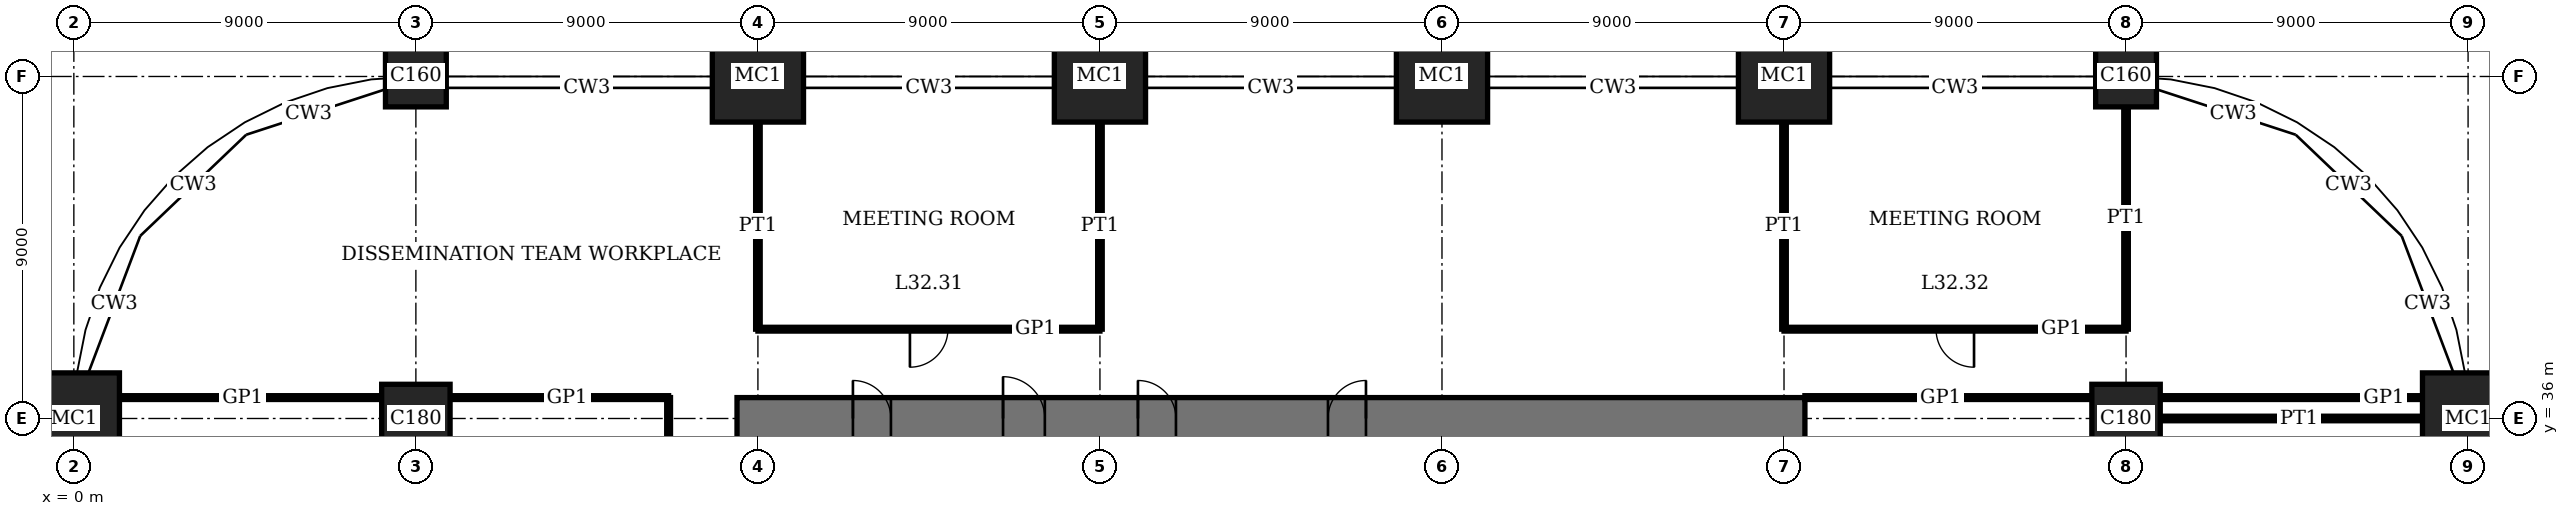
"""IFC4 building model, lengths in metres.
Left out: names, types, materials, properties, quantities, classifications, styles, units other than length and angle.
Written with IfcOpenShell. Run it as: python <this file> out.ifc"""

import sys

from ifc_helpers import new_model, si_unit, direction, frame, frame_2d, origin, origin_2d, place, context, subcontext, project, spatial, rectangle, extrude, element, fill, save


model = new_model("IFC4")
c1 = context("Model", 3, precision=1e-05, world=origin(), true_north=direction((0.0, 1.0)))
c2 = subcontext(c1, "Body", "Model", "MODEL_VIEW")
j1 = project(units=[si_unit("LENGTHUNIT", "METRE"), si_unit("PLANEANGLEUNIT", "RADIAN")], contexts=[c1])
p1 = place(None, origin())
s1 = spatial("IfcSite", under=j1, at=p1, CompositionType="ELEMENT")
p2 = place(p1, origin())
s2 = spatial("IfcBuilding", under=s1, at=p2, CompositionType="ELEMENT")
p3 = place(p2, frame((0.0, 0.0, 133.0)))
s3 = spatial("IfcBuildingStorey", under=s2, at=p3, CompositionType="ELEMENT", Elevation=133.0)
p4 = place(p3, frame((0.0, 36.0, 0.0), z_axis=(0.0, 0.0, 1.0), x_axis=(1.0, 0.0, 0.0)))
e1 = element("IfcColumn", 1, at=p4, inside=s3, PredefinedType="COLUMN", context=c2, shape_type="SweptSolid", body=[
    extrude(rectangle(XDim=2.4, YDim=2.4, at=origin_2d()), origin(), (0.0, 0.0, 1.0), 4.0),
])
p5 = place(p3, frame((9.0, 36.0, 0.0), z_axis=(0.0, 0.0, 1.0), x_axis=(1.0, 0.0, 0.0)))
e2 = element("IfcColumn", 2, at=p5, inside=s3, PredefinedType="COLUMN", context=c2, shape_type="SweptSolid", body=[
    extrude(rectangle(XDim=1.8, YDim=1.8, at=origin_2d()), origin(), (0.0, 0.0, 1.0), 4.0),
])
p6 = place(p3, frame((9.0, 45.0, 0.0), z_axis=(0.0, 0.0, 1.0), x_axis=(1.0, 0.0, 0.0)))
e3 = element("IfcColumn", 3, at=p6, inside=s3, PredefinedType="COLUMN", context=c2, shape_type="SweptSolid", body=[
    extrude(rectangle(XDim=1.6, YDim=1.6, at=origin_2d()), origin(), (0.0, 0.0, 1.0), 4.0),
])
for number, where, z_axis, x_axis in (
    (4, (18.0, 45.0, 0.0), (0.0, 0.0, 1.0), (1.0, 0.0, 0.0)),
    (5, (27.0, 45.0, 0.0), (0.0, 0.0, 1.0), (1.0, 0.0, 0.0)),
    (6, (36.0, 45.0, 0.0), (0.0, 0.0, 1.0), (1.0, 0.0, 0.0)),
    (7, (45.0, 45.0, 0.0), (0.0, 0.0, 1.0), (1.0, 0.0, 0.0)),
):
    element("IfcColumn", number, at=place(p3, frame(where, z_axis=z_axis, x_axis=x_axis)), inside=s3, PredefinedType="COLUMN", context=c2, shape_type="SweptSolid", body=[
        extrude(rectangle(XDim=2.4, YDim=2.4, at=origin_2d()), origin(), (0.0, 0.0, 1.0), 4.0),
    ])
p7 = place(p3, frame((54.0, 36.0, 0.0), z_axis=(0.0, 0.0, 1.0), x_axis=(1.0, 0.0, 0.0)))
e8 = element("IfcColumn", 8, at=p7, inside=s3, PredefinedType="COLUMN", context=c2, shape_type="SweptSolid", body=[
    extrude(rectangle(XDim=1.8, YDim=1.8, at=origin_2d()), origin(), (0.0, 0.0, 1.0), 4.0),
])
p8 = place(p3, frame((54.0, 45.0, 0.0), z_axis=(0.0, 0.0, 1.0), x_axis=(1.0, 0.0, 0.0)))
e9 = element("IfcColumn", 9, at=p8, inside=s3, PredefinedType="COLUMN", context=c2, shape_type="SweptSolid", body=[
    extrude(rectangle(XDim=1.6, YDim=1.6, at=origin_2d()), origin(), (0.0, 0.0, 1.0), 4.0),
])
p9 = place(p3, frame((63.0, 36.0, 0.0), z_axis=(0.0, 0.0, 1.0), x_axis=(1.0, 0.0, 0.0)))
e10 = element("IfcColumn", 10, at=p9, inside=s3, PredefinedType="COLUMN", context=c2, shape_type="SweptSolid", body=[
    extrude(rectangle(XDim=2.4, YDim=2.4, at=origin_2d()), origin(), (0.0, 0.0, 1.0), 4.0),
])
p10 = place(p3, frame((45.55, 36.0, 0.0), z_axis=(0.0, 0.0, 1.0), x_axis=(-1.0, 0.0, 0.0)))
e11 = element("IfcWall", 11, at=p10, inside=s3, PredefinedType="SHEAR", context=c2, shape_type="SweptSolid", body=[
    extrude(rectangle(XDim=28.1, YDim=1.1, at=frame_2d((14.05, 0.0))), origin(), (0.0, 0.0, 1.0), 4.0),
])
p11 = place(p10, frame((11.55, 0.0, 0.0)))
e12 = element("IfcOpeningElement", 12, at=p11, cuts=e11, PredefinedType="OPENING", context=c2, shape_type="SweptSolid", body=[
    extrude(rectangle(XDim=1.0, YDim=2.4, at=frame_2d((0.5, 1.2))), frame((0.0, 0.56, 0.0), z_axis=(0.0, -1.0, 0.0), x_axis=(1.0, 0.0, 0.0)), (0.0, 0.0, 1.0), 1.12),
])
p12 = place(p10, frame((16.55, 0.0, 0.0)))
e13 = element("IfcOpeningElement", 13, at=p12, cuts=e11, PredefinedType="OPENING", context=c2, shape_type="SweptSolid", body=[
    extrude(rectangle(XDim=1.0, YDim=2.4, at=frame_2d((0.5, 1.2))), frame((0.0, 0.56, 0.0), z_axis=(0.0, -1.0, 0.0), x_axis=(1.0, 0.0, 0.0)), (0.0, 0.0, 1.0), 1.12),
])
p13 = place(p10, frame((20.0, 0.0, 0.0)))
e14 = element("IfcOpeningElement", 14, at=p13, cuts=e11, PredefinedType="OPENING", context=c2, shape_type="SweptSolid", body=[
    extrude(rectangle(XDim=1.1, YDim=2.4, at=frame_2d((0.55, 1.2))), frame((0.0, 0.56, 0.0), z_axis=(0.0, -1.0, 0.0), x_axis=(1.0, 0.0, 0.0)), (0.0, 0.0, 1.0), 1.12),
])
p14 = place(p10, frame((24.05, 0.0, 0.0)))
e15 = element("IfcOpeningElement", 15, at=p14, cuts=e11, PredefinedType="OPENING", context=c2, shape_type="SweptSolid", body=[
    extrude(rectangle(XDim=1.0, YDim=2.4, at=frame_2d((0.5, 1.2))), frame((0.0, 0.56, 0.0), z_axis=(0.0, -1.0, 0.0), x_axis=(1.0, 0.0, 0.0)), (0.0, 0.0, 1.0), 1.12),
])
p15 = place(p3, frame((54.9, 36.0, 0.0), z_axis=(0.0, 0.0, 1.0), x_axis=(1.0, 0.0, 0.0)))
e16 = element("IfcWall", 16, at=p15, inside=s3, PredefinedType="PARTITIONING", context=c2, shape_type="SweptSolid", body=[
    extrude(rectangle(XDim=6.9, YDim=0.12, at=frame_2d((3.45, 0.0))), origin(), (0.0, 0.0, 1.0), 3.05),
])
p16 = place(p3, frame((1.2, 36.55, 0.0), z_axis=(0.0, 0.0, 1.0), x_axis=(1.0, 0.0, 0.0)))
e17 = element("IfcWall", 17, at=p16, inside=s3, PredefinedType="PARTITIONING", context=c2, shape_type="SweptSolid", body=[
    extrude(rectangle(XDim=6.9, YDim=0.1, at=frame_2d((3.45, 0.0))), origin(), (0.0, 0.0, 1.0), 3.75),
])
p17 = place(p3, frame((9.9, 36.55, 0.0), z_axis=(0.0, 0.0, 1.0), x_axis=(1.0, 0.0, 0.0)))
e18 = element("IfcWall", 18, at=p17, inside=s3, PredefinedType="PARTITIONING", context=c2, shape_type="SweptSolid", body=[
    extrude(rectangle(XDim=5.75, YDim=0.1, at=frame_2d((2.875, 0.0))), origin(), (0.0, 0.0, 1.0), 3.75),
])
p18 = place(p3, frame((45.55, 36.55, 0.0), z_axis=(0.0, 0.0, 1.0), x_axis=(1.0, 0.0, 0.0)))
e19 = element("IfcWall", 19, at=p18, inside=s3, PredefinedType="PARTITIONING", context=c2, shape_type="SweptSolid", body=[
    extrude(rectangle(XDim=7.55, YDim=0.1, at=frame_2d((3.775, 0.0))), origin(), (0.0, 0.0, 1.0), 3.75),
])
p19 = place(p3, frame((54.9, 36.55, 0.0), z_axis=(0.0, 0.0, 1.0), x_axis=(1.0, 0.0, 0.0)))
e20 = element("IfcWall", 20, at=p19, inside=s3, PredefinedType="PARTITIONING", context=c2, shape_type="SweptSolid", body=[
    extrude(rectangle(XDim=6.9, YDim=0.1, at=frame_2d((3.45, 0.0))), origin(), (0.0, 0.0, 1.0), 3.75),
])
p20 = place(p3, frame((18.0, 38.35, 0.0), z_axis=(0.0, 0.0, 1.0), x_axis=(1.0, 0.0, 0.0)))
e21 = element("IfcWall", 21, at=p20, inside=s3, PredefinedType="PARTITIONING", context=c2, shape_type="SweptSolid", body=[
    extrude(rectangle(XDim=9.0, YDim=0.1, at=frame_2d((4.5, 0.0))), origin(), (0.0, 0.0, 1.0), 3.75),
])
p21 = place(p20, frame((4.0, 0.0, 0.0)))
e22 = element("IfcOpeningElement", 22, at=p21, cuts=e21, PredefinedType="OPENING", context=c2, shape_type="SweptSolid", body=[
    extrude(rectangle(XDim=1.0, YDim=2.4, at=frame_2d((0.5, 1.2))), frame((0.0, 0.06, 0.0), z_axis=(0.0, -1.0, 0.0), x_axis=(1.0, 0.0, 0.0)), (0.0, 0.0, 1.0), 0.12),
])
p22 = place(p3, frame((45.0, 38.35, 0.0), z_axis=(0.0, 0.0, 1.0), x_axis=(1.0, 0.0, 0.0)))
e23 = element("IfcWall", 23, at=p22, inside=s3, PredefinedType="PARTITIONING", context=c2, shape_type="SweptSolid", body=[
    extrude(rectangle(XDim=9.0, YDim=0.1, at=frame_2d((4.5, 0.0))), origin(), (0.0, 0.0, 1.0), 3.75),
])
p23 = place(p22, frame((4.0, 0.0, 0.0)))
e24 = element("IfcOpeningElement", 24, at=p23, cuts=e23, PredefinedType="OPENING", context=c2, shape_type="SweptSolid", body=[
    extrude(rectangle(XDim=1.0, YDim=2.4, at=frame_2d((0.5, 1.2))), frame((0.0, 0.06, 0.0), z_axis=(0.0, -1.0, 0.0), x_axis=(1.0, 0.0, 0.0)), (0.0, 0.0, 1.0), 0.12),
])
p24 = place(p3, frame((15.65, 15.65, 0.0), z_axis=(0.0, 0.0, 1.0), x_axis=(0.0, 1.0, 0.0)))
e25 = element("IfcWall", 25, at=p24, inside=s3, PredefinedType="PARTITIONING", context=c2, shape_type="SweptSolid", body=[
    extrude(rectangle(XDim=20.9, YDim=0.1, at=frame_2d((10.45, 0.0))), origin(), (0.0, 0.0, 1.0), 3.75),
])
p25 = place(p24, frame((9.95, 0.0, 0.0)))
e26 = element("IfcOpeningElement", 26, at=p25, cuts=e25, PredefinedType="OPENING", context=c2, shape_type="SweptSolid", body=[
    extrude(rectangle(XDim=1.0, YDim=2.4, at=frame_2d((0.5, 1.2))), frame((0.0, 0.06, 0.0), z_axis=(0.0, -1.0, 0.0), x_axis=(1.0, 0.0, 0.0)), (0.0, 0.0, 1.0), 0.12),
])
for number, where, z_axis, x_axis in (
    (27, (18.0, 38.35, 0.0), (0.0, 0.0, 1.0), (0.0, 1.0, 0.0)),
    (28, (27.0, 38.35, 0.0), (0.0, 0.0, 1.0), (0.0, 1.0, 0.0)),
    (29, (45.0, 38.35, 0.0), (0.0, 0.0, 1.0), (0.0, 1.0, 0.0)),
):
    element("IfcWall", number, at=place(p3, frame(where, z_axis=z_axis, x_axis=x_axis)), inside=s3, PredefinedType="PARTITIONING", context=c2, shape_type="SweptSolid", body=[
        extrude(rectangle(XDim=5.45, YDim=0.12, at=frame_2d((2.725, 0.0))), origin(), (0.0, 0.0, 1.0), 3.05),
    ])
p26 = place(p3, frame((54.0, 38.35, 0.0), z_axis=(0.0, 0.0, 1.0), x_axis=(0.0, 1.0, 0.0)))
e30 = element("IfcWall", 30, at=p26, inside=s3, PredefinedType="PARTITIONING", context=c2, shape_type="SweptSolid", body=[
    extrude(rectangle(XDim=5.85, YDim=0.12, at=frame_2d((2.925, 0.0))), origin(), (0.0, 0.0, 1.0), 3.05),
])
p27 = place(p11, origin())
e31 = element("IfcDoor", 31, at=p27, inside=s3, OperationType="SINGLE_SWING_LEFT", PredefinedType="DOOR", context=c2, shape_type="SweptSolid", body=[
    extrude(rectangle(XDim=1.0, YDim=2.4, at=frame_2d((0.5, 1.2))), frame((0.0, 0.025, 0.0), z_axis=(0.0, -1.0, 0.0), x_axis=(1.0, 0.0, 0.0)), (0.0, 0.0, 1.0), 0.05),
    extrude(rectangle(XDim=0.04, YDim=2.4, at=frame_2d((0.02, 1.2))), frame((0.0, 0.4, 0.0), z_axis=(0.0, -1.0, 0.0), x_axis=(1.0, 0.0, 0.0)), (0.0, 0.0, 1.0), 0.8),
    extrude(rectangle(XDim=0.04, YDim=2.4, at=frame_2d((0.98, 1.2))), frame((0.0, 0.4, 0.0), z_axis=(0.0, -1.0, 0.0), x_axis=(1.0, 0.0, 0.0)), (0.0, 0.0, 1.0), 0.8),
    extrude(rectangle(XDim=1.0, YDim=0.04, at=frame_2d((0.5, 2.38))), frame((0.0, 0.4, 0.0), z_axis=(0.0, -1.0, 0.0), x_axis=(1.0, 0.0, 0.0)), (0.0, 0.0, 1.0), 0.8),
])
fill(e12, e31)
p28 = place(p12, origin())
e32 = element("IfcDoor", 32, at=p28, inside=s3, OperationType="SINGLE_SWING_RIGHT", PredefinedType="DOOR", context=c2, shape_type="SweptSolid", body=[
    extrude(rectangle(XDim=1.0, YDim=2.4, at=frame_2d((0.5, 1.2))), frame((0.0, 0.025, 0.0), z_axis=(0.0, -1.0, 0.0), x_axis=(1.0, 0.0, 0.0)), (0.0, 0.0, 1.0), 0.05),
    extrude(rectangle(XDim=0.04, YDim=2.4, at=frame_2d((0.02, 1.2))), frame((0.0, 0.4, 0.0), z_axis=(0.0, -1.0, 0.0), x_axis=(1.0, 0.0, 0.0)), (0.0, 0.0, 1.0), 0.8),
    extrude(rectangle(XDim=0.04, YDim=2.4, at=frame_2d((0.98, 1.2))), frame((0.0, 0.4, 0.0), z_axis=(0.0, -1.0, 0.0), x_axis=(1.0, 0.0, 0.0)), (0.0, 0.0, 1.0), 0.8),
    extrude(rectangle(XDim=1.0, YDim=0.04, at=frame_2d((0.5, 2.38))), frame((0.0, 0.4, 0.0), z_axis=(0.0, -1.0, 0.0), x_axis=(1.0, 0.0, 0.0)), (0.0, 0.0, 1.0), 0.8),
])
fill(e13, e32)
p29 = place(p13, origin())
e33 = element("IfcDoor", 33, at=p29, inside=s3, OperationType="SINGLE_SWING_RIGHT", PredefinedType="DOOR", context=c2, shape_type="SweptSolid", body=[
    extrude(rectangle(XDim=1.1, YDim=2.4, at=frame_2d((0.55, 1.2))), frame((0.0, 0.025, 0.0), z_axis=(0.0, -1.0, 0.0), x_axis=(1.0, 0.0, 0.0)), (0.0, 0.0, 1.0), 0.05),
    extrude(rectangle(XDim=0.04, YDim=2.4, at=frame_2d((0.02, 1.2))), frame((0.0, 0.44, 0.0), z_axis=(0.0, -1.0, 0.0), x_axis=(1.0, 0.0, 0.0)), (0.0, 0.0, 1.0), 0.88),
    extrude(rectangle(XDim=0.04, YDim=2.4, at=frame_2d((1.08, 1.2))), frame((0.0, 0.44, 0.0), z_axis=(0.0, -1.0, 0.0), x_axis=(1.0, 0.0, 0.0)), (0.0, 0.0, 1.0), 0.88),
    extrude(rectangle(XDim=1.1, YDim=0.04, at=frame_2d((0.55, 2.38))), frame((0.0, 0.44, 0.0), z_axis=(0.0, -1.0, 0.0), x_axis=(1.0, 0.0, 0.0)), (0.0, 0.0, 1.0), 0.88),
])
fill(e14, e33)
p30 = place(p14, origin())
e34 = element("IfcDoor", 34, at=p30, inside=s3, OperationType="SINGLE_SWING_RIGHT", PredefinedType="DOOR", context=c2, shape_type="SweptSolid", body=[
    extrude(rectangle(XDim=1.0, YDim=2.4, at=frame_2d((0.5, 1.2))), frame((0.0, 0.025, 0.0), z_axis=(0.0, -1.0, 0.0), x_axis=(1.0, 0.0, 0.0)), (0.0, 0.0, 1.0), 0.05),
    extrude(rectangle(XDim=0.04, YDim=2.4, at=frame_2d((0.02, 1.2))), frame((0.0, 0.4, 0.0), z_axis=(0.0, -1.0, 0.0), x_axis=(1.0, 0.0, 0.0)), (0.0, 0.0, 1.0), 0.8),
    extrude(rectangle(XDim=0.04, YDim=2.4, at=frame_2d((0.98, 1.2))), frame((0.0, 0.4, 0.0), z_axis=(0.0, -1.0, 0.0), x_axis=(1.0, 0.0, 0.0)), (0.0, 0.0, 1.0), 0.8),
    extrude(rectangle(XDim=1.0, YDim=0.04, at=frame_2d((0.5, 2.38))), frame((0.0, 0.4, 0.0), z_axis=(0.0, -1.0, 0.0), x_axis=(1.0, 0.0, 0.0)), (0.0, 0.0, 1.0), 0.8),
])
fill(e15, e34)
p31 = place(p21, origin())
e35 = element("IfcDoor", 35, at=p31, inside=s3, OperationType="SINGLE_SWING_LEFT", PredefinedType="DOOR", context=c2, shape_type="SweptSolid", body=[
    extrude(rectangle(XDim=1.0, YDim=2.4, at=frame_2d((0.5, 1.2))), frame((0.0, 0.02, 0.0), z_axis=(0.0, -1.0, 0.0), x_axis=(1.0, 0.0, 0.0)), (0.0, 0.0, 1.0), 0.04),
])
fill(e22, e35)
p32 = place(p23, origin())
e36 = element("IfcDoor", 36, at=p32, inside=s3, OperationType="SINGLE_SWING_RIGHT", PredefinedType="DOOR", context=c2, shape_type="SweptSolid", body=[
    extrude(rectangle(XDim=1.0, YDim=2.4, at=frame_2d((0.5, 1.2))), frame((0.0, 0.02, 0.0), z_axis=(0.0, -1.0, 0.0), x_axis=(1.0, 0.0, 0.0)), (0.0, 0.0, 1.0), 0.04),
])
fill(e24, e36)
save(model, sys.argv[1])
